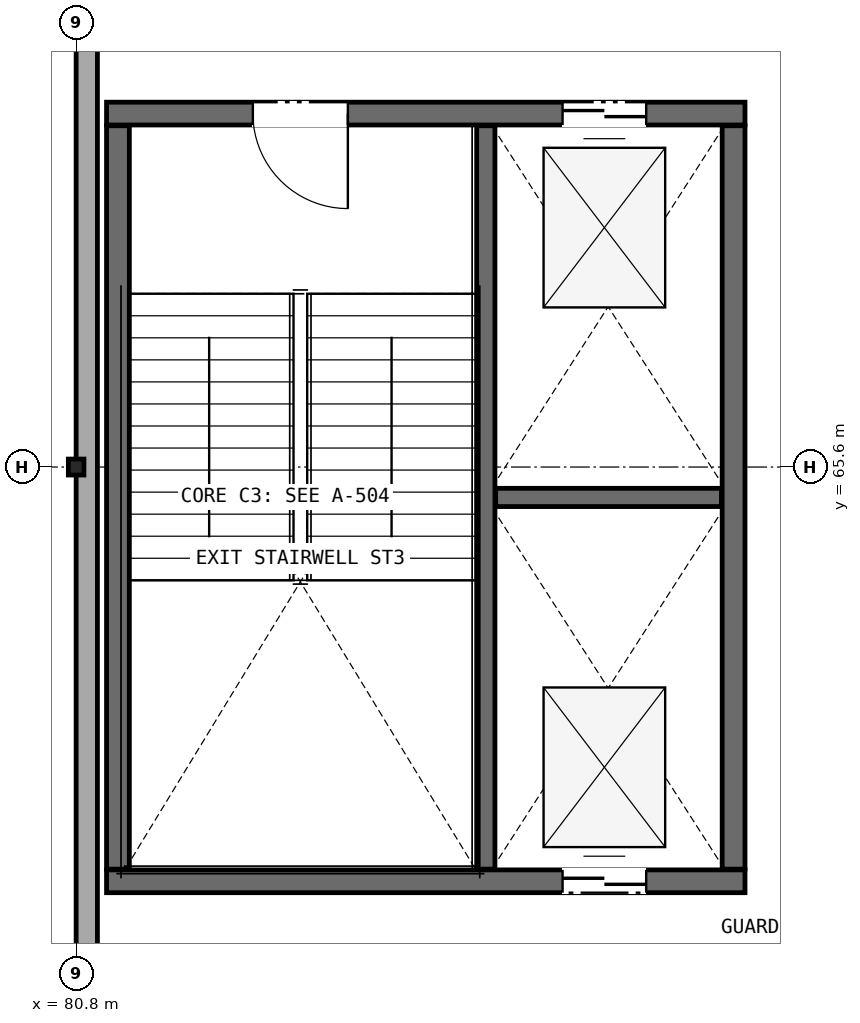
"""IFC4 building model, lengths in metres.
Left out: names, types, materials, properties, quantities, classifications, styles, units other than length and angle.
Written with IfcOpenShell. Run it as: python <this file> out.ifc"""

import sys

from ifc_helpers import new_model, si_unit, direction, frame, frame_2d, origin, origin_2d, place, context, subcontext, project, spatial, rectangle, i_section, extrude, element, fill, save


model = new_model("IFC4")
c1 = context("Model", 3, precision=1e-05, world=origin(), true_north=direction((0.0, 1.0)))
c2 = subcontext(c1, "Body", "Model", "MODEL_VIEW")
j1 = project(units=[si_unit("LENGTHUNIT", "METRE"), si_unit("PLANEANGLEUNIT", "RADIAN")], contexts=[c1])
p1 = place(None, origin())
s1 = spatial("IfcSite", under=j1, at=p1, CompositionType="ELEMENT")
p2 = place(p1, origin())
s2 = spatial("IfcBuilding", under=s1, at=p2, CompositionType="ELEMENT")
p3 = place(p2, frame((0.0, 0.0, 28.1)))
s3 = spatial("IfcBuildingStorey", under=s2, at=p3, CompositionType="ELEMENT", Elevation=28.1)
p4 = place(p3, frame((80.8, 65.6, 0.0), z_axis=(0.0, 0.0, 1.0), x_axis=(1.0, 0.0, 0.0)))
e1 = element("IfcColumn", 1, at=p4, inside=s3, PredefinedType="COLUMN", context=c2, shape_type="SweptSolid", body=[
    extrude(i_section(OverallWidth=0.205, OverallDepth=0.21, WebThickness=0.009, FlangeThickness=0.014, FilletRadius=0.01, at=origin_2d()), origin(), (0.0, 0.0, 1.0), 4.5),
])
p5 = place(p3, frame((80.94, 108.254, 0.0), z_axis=(0.0, 0.0, 1.0), x_axis=(0.0, -1.0, 0.0)))
e2 = element("IfcWall", 2, at=p5, inside=s3, PredefinedType="STANDARD", context=c2, shape_type="SweptSolid", body=[
    extrude(rectangle(XDim=51.308, YDim=0.28, at=frame_2d((25.654, 0.0))), origin(), (0.0, 0.0, 1.0), 3.702),
])
p6 = place(p5, frame((1.8, 0.0, 0.9)))
e3 = element("IfcOpeningElement", 3, at=p6, cuts=e2, PredefinedType="OPENING", context=c2, shape_type="SweptSolid", body=[
    extrude(rectangle(XDim=1.1, YDim=1.85, at=frame_2d((0.55, 0.925))), frame((0.0, 0.15, 0.0), z_axis=(0.0, -1.0, 0.0), x_axis=(1.0, 0.0, 0.0)), (0.0, 0.0, 1.0), 0.3),
])
p7 = place(p5, frame((20.2, 0.0, 0.9)))
e4 = element("IfcOpeningElement", 4, at=p7, cuts=e2, PredefinedType="OPENING", context=c2, shape_type="SweptSolid", body=[
    extrude(rectangle(XDim=1.25, YDim=1.85, at=frame_2d((0.625, 0.925))), frame((0.0, 0.15, 0.0), z_axis=(0.0, -1.0, 0.0), x_axis=(1.0, 0.0, 0.0)), (0.0, 0.0, 1.0), 0.3),
])
p8 = place(p5, frame((29.4, 0.0, 0.9)))
e5 = element("IfcOpeningElement", 5, at=p8, cuts=e2, PredefinedType="OPENING", context=c2, shape_type="SweptSolid", body=[
    extrude(rectangle(XDim=1.4, YDim=1.85, at=frame_2d((0.7, 0.925))), frame((0.0, 0.15, 0.0), z_axis=(0.0, -1.0, 0.0), x_axis=(1.0, 0.0, 0.0)), (0.0, 0.0, 1.0), 0.3),
])
p9 = place(p3, frame((81.2, 60.15, 0.0), z_axis=(0.0, 0.0, 1.0), x_axis=(1.0, 0.0, 0.0)))
e6 = element("IfcWall", 6, at=p9, inside=s3, PredefinedType="SHEAR", context=c2, shape_type="SweptSolid", body=[
    extrude(rectangle(XDim=8.4, YDim=0.3, at=frame_2d((4.2, 0.0))), origin(), (0.0, 0.0, 1.0), 4.245),
])
p10 = place(p9, frame((6.0, 0.0, 0.0)))
e7 = element("IfcOpeningElement", 7, at=p10, cuts=e6, PredefinedType="OPENING", context=c2, shape_type="SweptSolid", body=[
    extrude(rectangle(XDim=1.1, YDim=2.2, at=frame_2d((0.55, 1.1))), frame((0.0, 0.16, 0.0), z_axis=(0.0, -1.0, 0.0), x_axis=(1.0, 0.0, 0.0)), (0.0, 0.0, 1.0), 0.32),
])
p11 = place(p3, frame((89.6, 70.25, 0.0), z_axis=(0.0, 0.0, 1.0), x_axis=(-1.0, 0.0, 0.0)))
e8 = element("IfcWall", 8, at=p11, inside=s3, PredefinedType="SHEAR", context=c2, shape_type="SweptSolid", body=[
    extrude(rectangle(XDim=8.4, YDim=0.3, at=frame_2d((4.2, 0.0))), origin(), (0.0, 0.0, 1.0), 4.245),
])
p12 = place(p11, frame((5.225, 0.0, 0.0)))
e9 = element("IfcOpeningElement", 9, at=p12, cuts=e8, PredefinedType="OPENING", context=c2, shape_type="SweptSolid", body=[
    extrude(rectangle(XDim=1.25, YDim=2.2, at=frame_2d((0.625, 1.1))), frame((0.0, 0.16, 0.0), z_axis=(0.0, -1.0, 0.0), x_axis=(1.0, 0.0, 0.0)), (0.0, 0.0, 1.0), 0.32),
])
p13 = place(p11, frame((1.3, 0.0, 0.0)))
e10 = element("IfcOpeningElement", 10, at=p13, cuts=e8, PredefinedType="OPENING", context=c2, shape_type="SweptSolid", body=[
    extrude(rectangle(XDim=1.1, YDim=2.2, at=frame_2d((0.55, 1.1))), frame((0.0, 0.16, 0.0), z_axis=(0.0, -1.0, 0.0), x_axis=(1.0, 0.0, 0.0)), (0.0, 0.0, 1.0), 0.32),
])
for number, where, z_axis, x_axis in (
    (11, (89.45, 60.31, 0.0), (0.0, 0.0, 1.0), (0.0, 1.0, 0.0)),
    (12, (81.35, 70.09, 0.0), (0.0, 0.0, 1.0), (0.0, -1.0, 0.0)),
):
    element("IfcWall", number, at=place(p3, frame(where, z_axis=z_axis, x_axis=x_axis)), inside=s3, PredefinedType="SHEAR", context=c2, shape_type="SweptSolid", body=[
        extrude(rectangle(XDim=9.78, YDim=0.3, at=frame_2d((4.89, 0.0))), origin(), (0.0, 0.0, 1.0), 4.245),
    ])
p14 = place(p3, frame((86.19, 60.31, 0.0), z_axis=(0.0, 0.0, 1.0), x_axis=(0.0, 1.0, 0.0)))
e13 = element("IfcWall", 13, at=p14, inside=s3, PredefinedType="SOLIDWALL", context=c2, shape_type="SweptSolid", body=[
    extrude(rectangle(XDim=9.78, YDim=0.24, at=frame_2d((4.89, 0.0))), origin(), (0.0, 0.0, 1.0), 4.245),
])
p15 = place(p3, frame((86.32, 65.2, 0.0), z_axis=(0.0, 0.0, 1.0), x_axis=(1.0, 0.0, 0.0)))
e14 = element("IfcWall", 14, at=p15, inside=s3, PredefinedType="SOLIDWALL", context=c2, shape_type="SweptSolid", body=[
    extrude(rectangle(XDim=2.97, YDim=0.24, at=frame_2d((1.485, 0.0))), origin(), (0.0, 0.0, 1.0), 4.245),
])
p16 = place(p12, origin())
e15 = element("IfcDoor", 15, at=p16, inside=s3, OperationType="SINGLE_SWING_LEFT", PredefinedType="DOOR", context=c2, shape_type="SweptSolid", body=[
    extrude(rectangle(XDim=1.25, YDim=2.2, at=frame_2d((0.625, 1.1))), frame((0.0, 0.025, 0.0), z_axis=(0.0, -1.0, 0.0), x_axis=(1.0, 0.0, 0.0)), (0.0, 0.0, 1.0), 0.05),
])
fill(e9, e15)
p17 = place(p10, origin())
e16 = element("IfcDoor", 16, at=p17, inside=s3, OperationType="DOUBLE_DOOR_SLIDING", PredefinedType="DOOR", context=c2, shape_type="SweptSolid", body=[
    extrude(rectangle(XDim=1.1, YDim=2.2, at=frame_2d((0.55, 1.1))), frame((0.0, 0.025, 0.0), z_axis=(0.0, -1.0, 0.0), x_axis=(1.0, 0.0, 0.0)), (0.0, 0.0, 1.0), 0.05),
])
fill(e7, e16)
p18 = place(p13, origin())
e17 = element("IfcDoor", 17, at=p18, inside=s3, OperationType="DOUBLE_DOOR_SLIDING", PredefinedType="DOOR", context=c2, shape_type="SweptSolid", body=[
    extrude(rectangle(XDim=1.1, YDim=2.2, at=frame_2d((0.55, 1.1))), frame((0.0, 0.025, 0.0), z_axis=(0.0, -1.0, 0.0), x_axis=(1.0, 0.0, 0.0)), (0.0, 0.0, 1.0), 0.05),
])
fill(e10, e17)
save(model, sys.argv[1])
